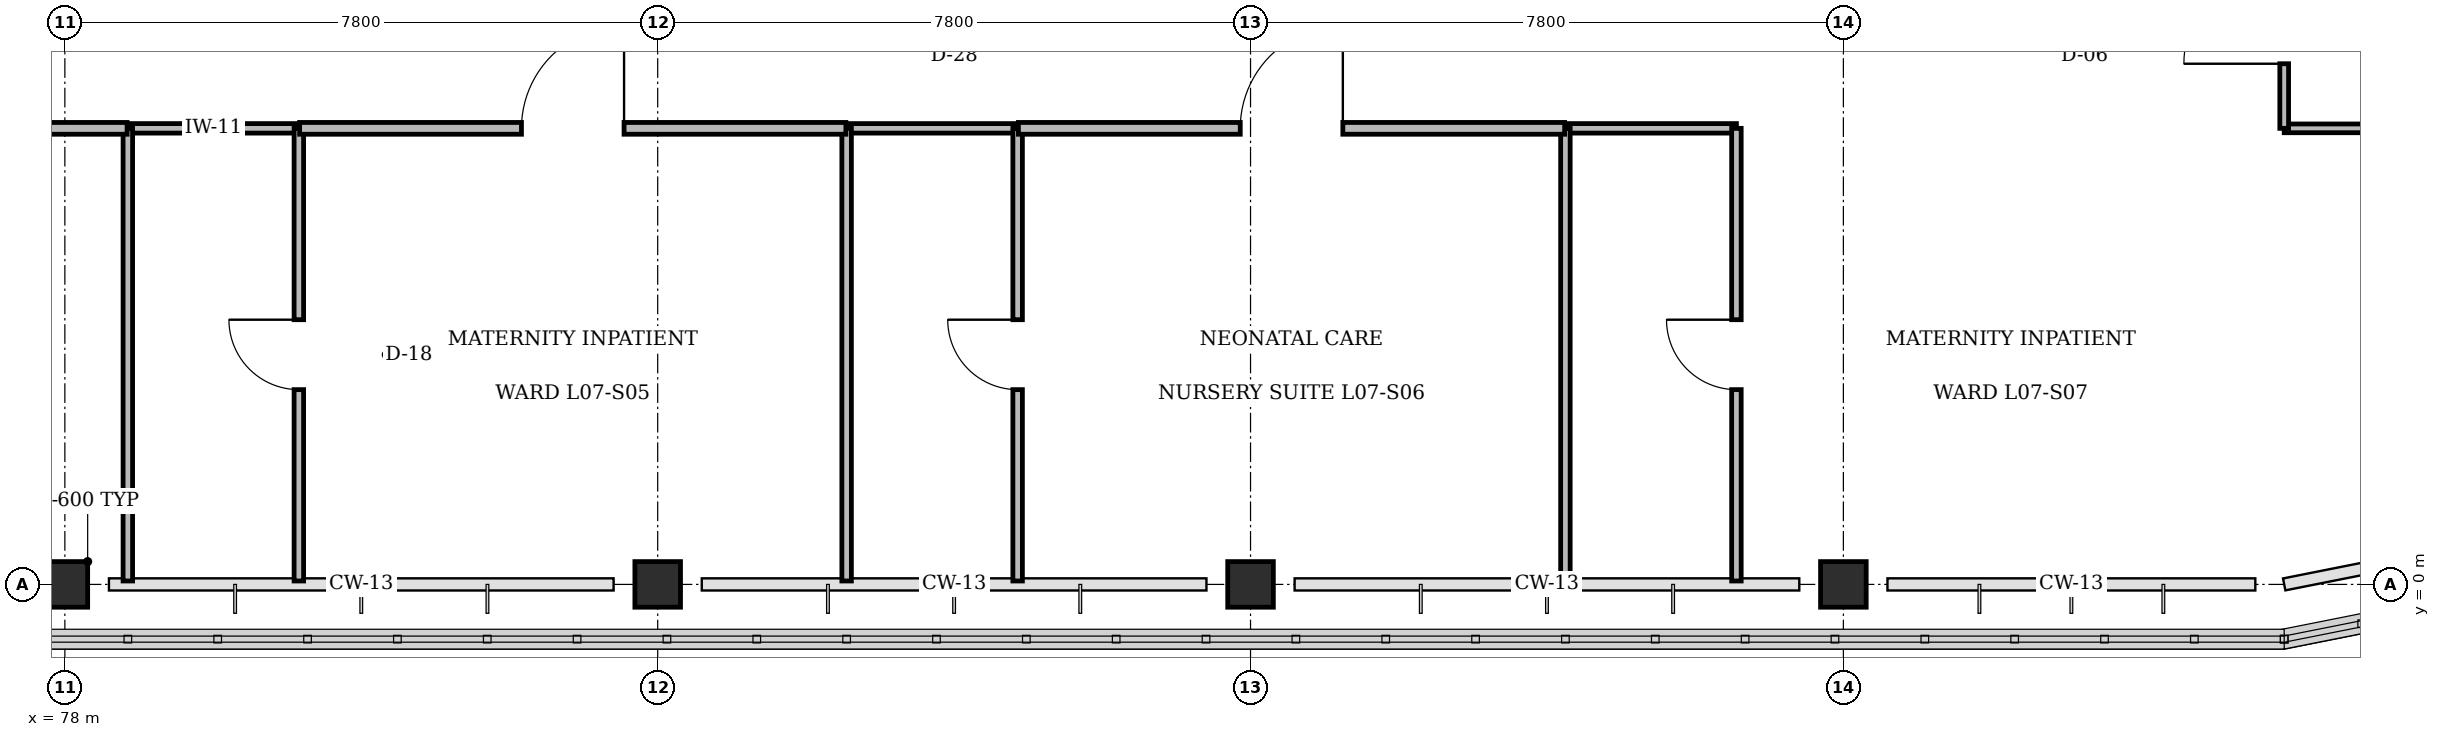
"""IFC4 building model, lengths in metres.
Left out: names, types, materials, properties, quantities, classifications, styles, units other than length and angle.
Written with IfcOpenShell. Run it as: python <this file> out.ifc"""

import sys

from ifc_helpers import new_model, si_unit, direction, frame, frame_2d, origin, origin_2d, place, context, subcontext, project, spatial, rectangle, extrude, element, fill, save


model = new_model("IFC4")
c1 = context("Model", 3, precision=1e-05, world=origin(), true_north=direction((0.0, 1.0)))
c2 = subcontext(c1, "Body", "Model", "MODEL_VIEW")
j1 = project(units=[si_unit("LENGTHUNIT", "METRE"), si_unit("PLANEANGLEUNIT", "RADIAN")], contexts=[c1])
p1 = place(None, origin())
s1 = spatial("IfcSite", under=j1, at=p1, CompositionType="ELEMENT")
p2 = place(p1, origin())
s2 = spatial("IfcBuilding", under=s1, at=p2, CompositionType="ELEMENT")
p3 = place(p2, frame((0.0, 0.0, 30.6)))
s3 = spatial("IfcBuildingStorey", under=s2, at=p3, CompositionType="ELEMENT", Elevation=30.6)
for number, where, z_axis, x_axis in (
    (1, (78.0, 0.0, 0.0), (0.0, 0.0, 1.0), (1.0, 0.0, 0.0)),
    (2, (85.8, 0.0, 0.0), (0.0, 0.0, 1.0), (1.0, 0.0, 0.0)),
    (3, (93.6, 0.0, 0.0), (0.0, 0.0, 1.0), (1.0, 0.0, 0.0)),
    (4, (101.4, 0.0, 0.0), (0.0, 0.0, 1.0), (1.0, 0.0, 0.0)),
):
    element("IfcColumn", number, at=place(p3, frame(where, z_axis=z_axis, x_axis=x_axis)), inside=s3, PredefinedType="COLUMN", context=c2, shape_type="SweptSolid", body=[
        extrude(rectangle(XDim=0.6, YDim=0.6, at=origin_2d()), origin(), (0.0, 0.0, 1.0), 4.2),
    ])
p4 = place(p3, frame((78.829, 6.0, 0.0), z_axis=(0.0, 0.0, 1.0), x_axis=(1.0, 0.0, 0.0)))
e5 = element("IfcWall", 5, at=p4, inside=s3, PredefinedType="PARTITIONING", context=c2, shape_type="SweptSolid", body=[
    extrude(rectangle(XDim=2.25, YDim=0.125, at=frame_2d((1.125, 0.0))), origin(), (0.0, 0.0, 1.0), 3.9),
])
p5 = place(p3, frame((78.829, 0.045, 0.0), z_axis=(0.0, 0.0, 1.0), x_axis=(0.0, 1.0, 0.0)))
e6 = element("IfcWall", 6, at=p5, inside=s3, PredefinedType="PARTITIONING", context=c2, shape_type="SweptSolid", body=[
    extrude(rectangle(XDim=5.955, YDim=0.125, at=frame_2d((2.978, 0.0))), origin(), (0.0, 0.0, 1.0), 3.9),
])
p6 = place(p3, frame((81.079, 0.045, 0.0), z_axis=(0.0, 0.0, 1.0), x_axis=(0.0, 1.0, 0.0)))
e7 = element("IfcWall", 7, at=p6, inside=s3, PredefinedType="PARTITIONING", context=c2, shape_type="SweptSolid", body=[
    extrude(rectangle(XDim=5.955, YDim=0.125, at=frame_2d((2.978, 0.0))), origin(), (0.0, 0.0, 1.0), 3.9),
])
p7 = place(p6, frame((2.518, 0.0, 0.0)))
e8 = element("IfcOpeningElement", 8, at=p7, cuts=e7, PredefinedType="OPENING", context=c2, shape_type="SweptSolid", body=[
    extrude(rectangle(XDim=0.92, YDim=2.1, at=frame_2d((0.46, 1.05))), frame((0.0, 0.073, 0.0), z_axis=(0.0, -1.0, 0.0), x_axis=(1.0, 0.0, 0.0)), (0.0, 0.0, 1.0), 0.145),
])
p8 = place(p3, frame((88.286, 6.0, 0.0), z_axis=(0.0, 0.0, 1.0), x_axis=(1.0, 0.0, 0.0)))
e9 = element("IfcWall", 9, at=p8, inside=s3, PredefinedType="PARTITIONING", context=c2, shape_type="SweptSolid", body=[
    extrude(rectangle(XDim=2.25, YDim=0.125, at=frame_2d((1.125, 0.0))), origin(), (0.0, 0.0, 1.0), 3.9),
])
p9 = place(p3, frame((88.286, 0.045, 0.0), z_axis=(0.0, 0.0, 1.0), x_axis=(0.0, 1.0, 0.0)))
e10 = element("IfcWall", 10, at=p9, inside=s3, PredefinedType="PARTITIONING", context=c2, shape_type="SweptSolid", body=[
    extrude(rectangle(XDim=5.955, YDim=0.125, at=frame_2d((2.978, 0.0))), origin(), (0.0, 0.0, 1.0), 3.9),
])
p10 = place(p3, frame((90.536, 0.045, 0.0), z_axis=(0.0, 0.0, 1.0), x_axis=(0.0, 1.0, 0.0)))
e11 = element("IfcWall", 11, at=p10, inside=s3, PredefinedType="PARTITIONING", context=c2, shape_type="SweptSolid", body=[
    extrude(rectangle(XDim=5.955, YDim=0.125, at=frame_2d((2.978, 0.0))), origin(), (0.0, 0.0, 1.0), 3.9),
])
p11 = place(p10, frame((2.518, 0.0, 0.0)))
e12 = element("IfcOpeningElement", 12, at=p11, cuts=e11, PredefinedType="OPENING", context=c2, shape_type="SweptSolid", body=[
    extrude(rectangle(XDim=0.92, YDim=2.1, at=frame_2d((0.46, 1.05))), frame((0.0, 0.073, 0.0), z_axis=(0.0, -1.0, 0.0), x_axis=(1.0, 0.0, 0.0)), (0.0, 0.0, 1.0), 0.145),
])
p12 = place(p3, frame((97.743, 6.0, 0.0), z_axis=(0.0, 0.0, 1.0), x_axis=(1.0, 0.0, 0.0)))
e13 = element("IfcWall", 13, at=p12, inside=s3, PredefinedType="PARTITIONING", context=c2, shape_type="SweptSolid", body=[
    extrude(rectangle(XDim=2.25, YDim=0.125, at=frame_2d((1.125, 0.0))), origin(), (0.0, 0.0, 1.0), 3.9),
])
p13 = place(p3, frame((97.743, 0.045, 0.0), z_axis=(0.0, 0.0, 1.0), x_axis=(0.0, 1.0, 0.0)))
e14 = element("IfcWall", 14, at=p13, inside=s3, PredefinedType="PARTITIONING", context=c2, shape_type="SweptSolid", body=[
    extrude(rectangle(XDim=5.955, YDim=0.125, at=frame_2d((2.978, 0.0))), origin(), (0.0, 0.0, 1.0), 3.9),
])
p14 = place(p3, frame((99.993, 0.045, 0.0), z_axis=(0.0, 0.0, 1.0), x_axis=(0.0, 1.0, 0.0)))
e15 = element("IfcWall", 15, at=p14, inside=s3, PredefinedType="PARTITIONING", context=c2, shape_type="SweptSolid", body=[
    extrude(rectangle(XDim=5.955, YDim=0.125, at=frame_2d((2.978, 0.0))), origin(), (0.0, 0.0, 1.0), 3.9),
])
p15 = place(p14, frame((2.518, 0.0, 0.0)))
e16 = element("IfcOpeningElement", 16, at=p15, cuts=e15, PredefinedType="OPENING", context=c2, shape_type="SweptSolid", body=[
    extrude(rectangle(XDim=0.92, YDim=2.1, at=frame_2d((0.46, 1.05))), frame((0.0, 0.073, 0.0), z_axis=(0.0, -1.0, 0.0), x_axis=(1.0, 0.0, 0.0)), (0.0, 0.0, 1.0), 0.145),
])
p16 = place(p3, frame((107.2, 6.0, 0.0), z_axis=(0.0, 0.0, 1.0), x_axis=(1.0, 0.0, 0.0)))
e17 = element("IfcWall", 17, at=p16, inside=s3, PredefinedType="PARTITIONING", context=c2, shape_type="SweptSolid", body=[
    extrude(rectangle(XDim=12.1, YDim=0.115, at=frame_2d((6.05, 0.0))), origin(), (0.0, 0.0, 1.0), 3.9),
])
p17 = place(p3, frame((107.2, 6.0, 0.0), z_axis=(0.0, 0.0, 1.0), x_axis=(0.0, 1.0, 0.0)))
e18 = element("IfcWall", 18, at=p17, inside=s3, PredefinedType="PARTITIONING", context=c2, shape_type="SweptSolid", body=[
    extrude(rectangle(XDim=13.2, YDim=0.115, at=frame_2d((6.6, 0.0))), origin(), (0.0, 0.0, 1.0), 3.9),
])
p18 = place(p17, frame((0.85, 0.0, 0.0)))
e19 = element("IfcOpeningElement", 19, at=p18, cuts=e18, PredefinedType="OPENING", context=c2, shape_type="SweptSolid", body=[
    extrude(rectangle(XDim=1.32, YDim=2.15, at=frame_2d((0.66, 1.075))), frame((0.0, 0.067, 0.0), z_axis=(0.0, -1.0, 0.0), x_axis=(1.0, 0.0, 0.0)), (0.0, 0.0, 1.0), 0.135),
])
p19 = place(p3, frame((71.631, 6.0, 0.0), z_axis=(0.0, 0.0, 1.0), x_axis=(1.0, 0.0, 0.0)))
e20 = element("IfcWall", 20, at=p19, inside=s3, PredefinedType="PARTITIONING", context=c2, shape_type="SweptSolid", body=[
    extrude(rectangle(XDim=7.188, YDim=0.155, at=frame_2d((3.594, 0.0))), origin(), (0.0, 0.0, 1.0), 3.9),
])
p20 = place(p19, frame((2.919, 0.0, 0.0)))
e21 = element("IfcOpeningElement", 21, at=p20, cuts=e20, PredefinedType="OPENING", context=c2, shape_type="SweptSolid", body=[
    extrude(rectangle(XDim=1.35, YDim=2.2, at=frame_2d((0.675, 1.1))), frame((0.0, 0.087, 0.0), z_axis=(0.0, -1.0, 0.0), x_axis=(1.0, 0.0, 0.0)), (0.0, 0.0, 1.0), 0.175),
])
p21 = place(p3, frame((81.089, 6.0, 0.0), z_axis=(0.0, 0.0, 1.0), x_axis=(1.0, 0.0, 0.0)))
e22 = element("IfcWall", 22, at=p21, inside=s3, PredefinedType="PARTITIONING", context=c2, shape_type="SweptSolid", body=[
    extrude(rectangle(XDim=7.187, YDim=0.155, at=frame_2d((3.593, 0.0))), origin(), (0.0, 0.0, 1.0), 3.9),
])
p22 = place(p21, frame((2.918, 0.0, 0.0)))
e23 = element("IfcOpeningElement", 23, at=p22, cuts=e22, PredefinedType="OPENING", context=c2, shape_type="SweptSolid", body=[
    extrude(rectangle(XDim=1.35, YDim=2.2, at=frame_2d((0.675, 1.1))), frame((0.0, 0.087, 0.0), z_axis=(0.0, -1.0, 0.0), x_axis=(1.0, 0.0, 0.0)), (0.0, 0.0, 1.0), 0.175),
])
p23 = place(p3, frame((90.546, 6.0, 0.0), z_axis=(0.0, 0.0, 1.0), x_axis=(1.0, 0.0, 0.0)))
e24 = element("IfcWall", 24, at=p23, inside=s3, PredefinedType="PARTITIONING", context=c2, shape_type="SweptSolid", body=[
    extrude(rectangle(XDim=7.187, YDim=0.155, at=frame_2d((3.594, 0.0))), origin(), (0.0, 0.0, 1.0), 3.9),
])
p24 = place(p23, frame((2.918, 0.0, 0.0)))
e25 = element("IfcOpeningElement", 25, at=p24, cuts=e24, PredefinedType="OPENING", context=c2, shape_type="SweptSolid", body=[
    extrude(rectangle(XDim=1.35, YDim=2.2, at=frame_2d((0.675, 1.1))), frame((0.0, 0.087, 0.0), z_axis=(0.0, -1.0, 0.0), x_axis=(1.0, 0.0, 0.0)), (0.0, 0.0, 1.0), 0.175),
])
p25 = place(p7, origin())
e26 = element("IfcDoor", 26, at=p25, inside=s3, OperationType="SINGLE_SWING_RIGHT", PredefinedType="DOOR", context=c2, shape_type="SweptSolid", body=[
    extrude(rectangle(XDim=0.92, YDim=2.1, at=frame_2d((0.46, 1.05))), frame((0.0, 0.025, 0.0), z_axis=(0.0, -1.0, 0.0), x_axis=(1.0, 0.0, 0.0)), (0.0, 0.0, 1.0), 0.05),
])
fill(e8, e26)
p26 = place(p11, origin())
e27 = element("IfcDoor", 27, at=p26, inside=s3, OperationType="SINGLE_SWING_RIGHT", PredefinedType="DOOR", context=c2, shape_type="SweptSolid", body=[
    extrude(rectangle(XDim=0.92, YDim=2.1, at=frame_2d((0.46, 1.05))), frame((0.0, 0.025, 0.0), z_axis=(0.0, -1.0, 0.0), x_axis=(1.0, 0.0, 0.0)), (0.0, 0.0, 1.0), 0.05),
])
fill(e12, e27)
p27 = place(p15, origin())
e28 = element("IfcDoor", 28, at=p27, inside=s3, OperationType="SINGLE_SWING_RIGHT", PredefinedType="DOOR", context=c2, shape_type="SweptSolid", body=[
    extrude(rectangle(XDim=0.92, YDim=2.1, at=frame_2d((0.46, 1.05))), frame((0.0, 0.025, 0.0), z_axis=(0.0, -1.0, 0.0), x_axis=(1.0, 0.0, 0.0)), (0.0, 0.0, 1.0), 0.05),
])
fill(e16, e28)
p28 = place(p18, origin())
e29 = element("IfcDoor", 29, at=p28, inside=s3, OperationType="SINGLE_SWING_LEFT", PredefinedType="DOOR", context=c2, shape_type="SweptSolid", body=[
    extrude(rectangle(XDim=1.32, YDim=2.15, at=frame_2d((0.66, 1.075))), frame((0.0, 0.025, 0.0), z_axis=(0.0, -1.0, 0.0), x_axis=(1.0, 0.0, 0.0)), (0.0, 0.0, 1.0), 0.05),
])
fill(e19, e29)
p29 = place(p22, origin())
e30 = element("IfcDoor", 30, at=p29, inside=s3, OperationType="SINGLE_SWING_RIGHT", PredefinedType="DOOR", context=c2, shape_type="SweptSolid", body=[
    extrude(rectangle(XDim=1.35, YDim=2.2, at=frame_2d((0.675, 1.1))), frame((0.0, 0.025, 0.0), z_axis=(0.0, -1.0, 0.0), x_axis=(1.0, 0.0, 0.0)), (0.0, 0.0, 1.0), 0.05),
])
fill(e23, e30)
p30 = place(p24, origin())
e31 = element("IfcDoor", 31, at=p30, inside=s3, OperationType="SINGLE_SWING_RIGHT", PredefinedType="DOOR", context=c2, shape_type="SweptSolid", body=[
    extrude(rectangle(XDim=1.35, YDim=2.2, at=frame_2d((0.675, 1.1))), frame((0.0, 0.025, 0.0), z_axis=(0.0, -1.0, 0.0), x_axis=(1.0, 0.0, 0.0)), (0.0, 0.0, 1.0), 0.05),
])
fill(e25, e31)
save(model, sys.argv[1])
